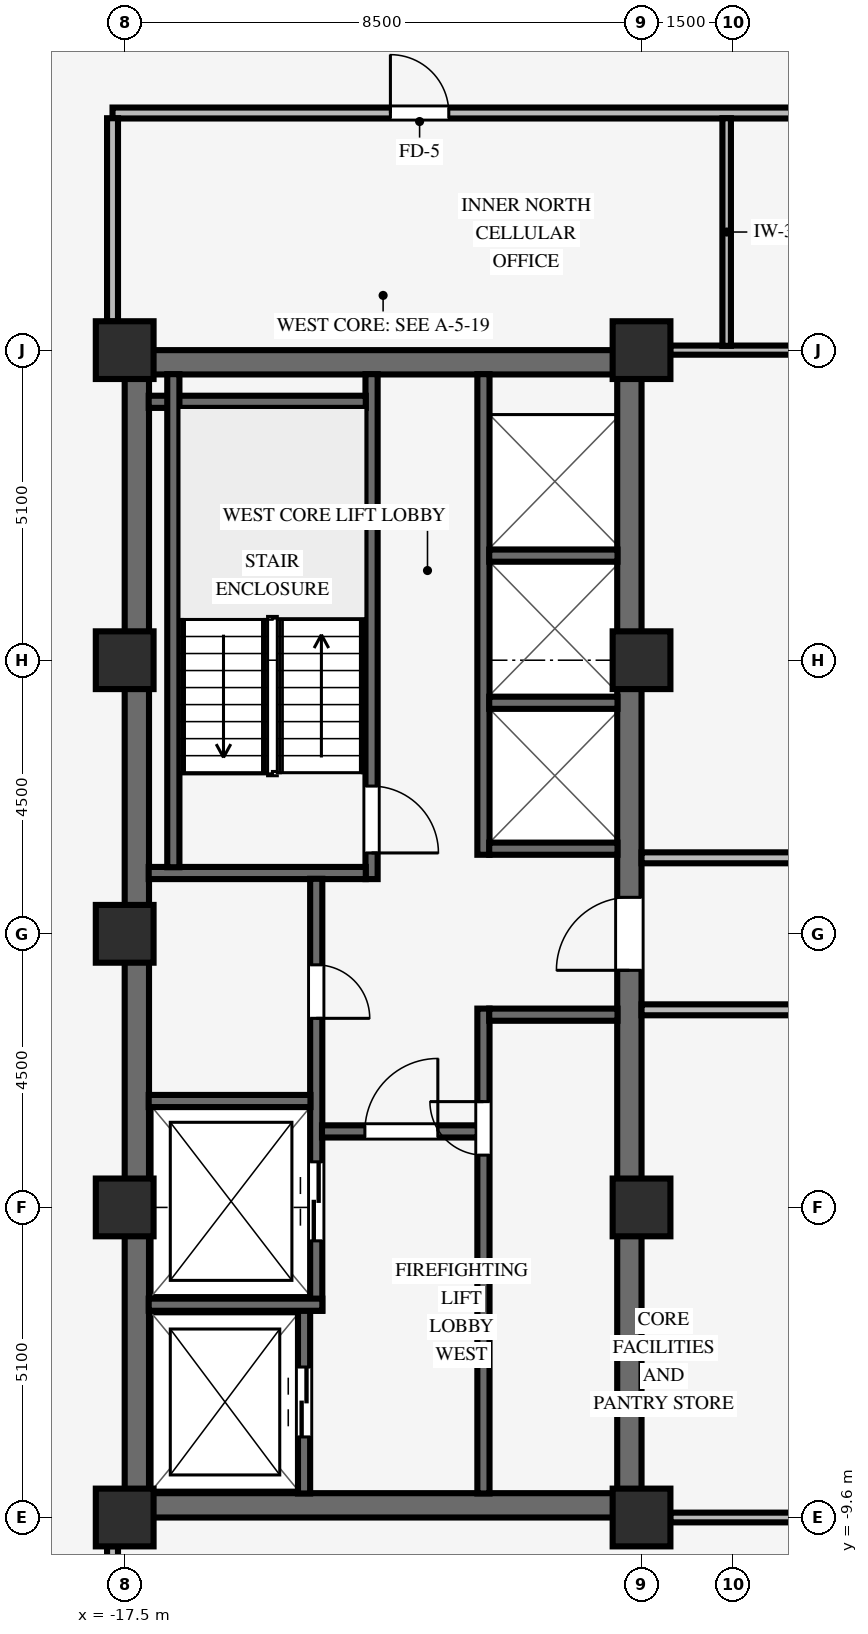
"""IFC4 building model, lengths in metres.
Left out: names, types, materials, properties, quantities, classifications, styles, units other than length and angle.
Written with IfcOpenShell. Run it as: python <this file> out.ifc"""

import sys

from ifc_helpers import new_model, si_unit, direction, frame, frame_2d, origin, origin_2d, place, context, subcontext, project, spatial, rectangle, extrude, source, transform, mapped, element, fill, save


model = new_model("IFC4")
c1 = context("Model", 3, precision=1e-05, world=origin(), true_north=direction((0.0, 1.0)))
c2 = subcontext(c1, "Body", "Model", "MODEL_VIEW")
j1 = project(units=[si_unit("LENGTHUNIT", "METRE"), si_unit("PLANEANGLEUNIT", "RADIAN")], contexts=[c1])
p1 = place(None, origin())
s1 = spatial("IfcSite", under=j1, at=p1, CompositionType="ELEMENT")
p2 = place(p1, origin())
s2 = spatial("IfcBuilding", under=s1, at=p2, CompositionType="ELEMENT")
p3 = place(p2, frame((0.0, 0.0, 138.45)))
s3 = spatial("IfcBuildingStorey", under=s2, at=p3, CompositionType="ELEMENT", Elevation=138.45)
for number, where, z_axis, x_axis in (
    (1, (-17.5, -9.4, 0.0), (0.0, 0.0, 1.0), (1.0, 0.0, 0.0)),
    (2, (-17.5, 9.4, 0.0), (0.0, 0.0, 1.0), (1.0, 0.0, 0.0)),
):
    element("IfcWall", number, at=place(p3, frame(where, z_axis=z_axis, x_axis=x_axis)), inside=s3, PredefinedType="SHEAR", context=c2, shape_type="SweptSolid", body=[
        extrude(rectangle(XDim=8.5, YDim=0.4, at=frame_2d((4.25, 0.0))), origin(), (0.0, 0.0, 1.0), 3.37),
    ])
p4 = place(p3, frame((-17.3, -9.205, 0.0), z_axis=(0.0, 0.0, 1.0), x_axis=(0.0, 1.0, 0.0)))
e3 = element("IfcWall", 3, at=p4, inside=s3, PredefinedType="SHEAR", context=c2, shape_type="SweptSolid", body=[
    extrude(rectangle(XDim=18.41, YDim=0.4, at=frame_2d((9.205, 0.0))), origin(), (0.0, 0.0, 1.0), 3.37),
])
p5 = place(p3, frame((-9.2, -9.205, 0.0), z_axis=(0.0, 0.0, 1.0), x_axis=(0.0, 1.0, 0.0)))
e4 = element("IfcWall", 4, at=p5, inside=s3, PredefinedType="SHEAR", context=c2, shape_type="SweptSolid", body=[
    extrude(rectangle(XDim=18.41, YDim=0.4, at=frame_2d((9.205, 0.0))), origin(), (0.0, 0.0, 1.0), 3.37),
])
p6 = place(p5, frame((8.605, 0.0, 0.0)))
e5 = element("IfcOpeningElement", 5, at=p6, cuts=e4, PredefinedType="OPENING", context=c2, shape_type="SweptSolid", body=[
    extrude(rectangle(XDim=1.2, YDim=2.15, at=frame_2d((0.6, 1.075))), frame((0.0, 0.21, 0.0), z_axis=(0.0, -1.0, 0.0), x_axis=(1.0, 0.0, 0.0)), (0.0, 0.0, 1.0), 0.42),
])
for number, where, z_axis, x_axis in (
    (6, (-17.5, -9.6, 0.0), (0.0, 0.0, 1.0), (1.0, 0.0, 0.0)),
    (7, (-17.5, -4.5, 0.0), (0.0, 0.0, 1.0), (1.0, 0.0, 0.0)),
    (8, (-17.5, 4.5, 0.0), (0.0, 0.0, 1.0), (1.0, 0.0, 0.0)),
    (9, (-17.5, 9.6, 0.0), (0.0, 0.0, 1.0), (1.0, 0.0, 0.0)),
    (10, (-9.0, -9.6, 0.0), (0.0, 0.0, 1.0), (1.0, 0.0, 0.0)),
    (11, (-9.0, -4.5, 0.0), (0.0, 0.0, 1.0), (1.0, 0.0, 0.0)),
    (12, (-9.0, 4.5, 0.0), (0.0, 0.0, 1.0), (1.0, 0.0, 0.0)),
    (13, (-9.0, 9.6, 0.0), (0.0, 0.0, 1.0), (1.0, 0.0, 0.0)),
    (14, (-17.5, 0.0, 0.0), (0.0, 0.0, 1.0), (1.0, 0.0, 0.0)),
):
    element("IfcColumn", number, at=place(p3, frame(where, z_axis=z_axis, x_axis=x_axis)), inside=s3, PredefinedType="COLUMN", context=c2, shape_type="SweptSolid", body=[
        extrude(rectangle(XDim=0.95, YDim=0.95, at=origin_2d()), origin(), (0.0, 0.0, 1.0), 3.37),
    ])
p7 = place(p3, frame((-13.44, 0.9, 0.0), z_axis=(0.0, 0.0, 1.0), x_axis=(0.0, 1.0, 0.0)))
e15 = element("IfcWall", 15, at=p7, inside=s3, PredefinedType="SHEAR", context=c2, shape_type="SweptSolid", body=[
    extrude(rectangle(XDim=8.305, YDim=0.2, at=frame_2d((4.153, 0.0))), origin(), (0.0, 0.0, 1.0), 3.37),
])
p8 = place(p7, frame((1.53, 0.0, 0.0), z_axis=(0.0, 0.0, 1.0), x_axis=(-1.0, 0.0, 0.0)))
e16 = element("IfcOpeningElement", 16, at=p8, cuts=e15, PredefinedType="OPENING", context=c2, shape_type="SweptSolid", body=[
    extrude(rectangle(XDim=1.1, YDim=2.15, at=frame_2d((0.55, 1.075))), frame((0.0, 0.11, 0.0), z_axis=(0.0, -1.0, 0.0), x_axis=(1.0, 0.0, 0.0)), (0.0, 0.0, 1.0), 0.22),
])
for number, where, z_axis, x_axis in (
    (17, (-17.105, 1.0, 0.0), (0.0, 0.0, 1.0), (1.0, 0.0, 0.0)),
    (18, (-17.105, 8.75, 0.0), (0.0, 0.0, 1.0), (1.0, 0.0, 0.0)),
):
    element("IfcWall", number, at=place(p3, frame(where, z_axis=z_axis, x_axis=x_axis)), inside=s3, PredefinedType="SHEAR", context=c2, shape_type="SweptSolid", body=[
        extrude(rectangle(XDim=3.57, YDim=0.2, at=frame_2d((1.785, 0.0))), origin(), (0.0, 0.0, 1.0), 3.37),
    ])
p9 = place(p3, frame((-16.7, 1.095, 0.0), z_axis=(0.0, 0.0, 1.0), x_axis=(0.0, 1.0, 0.0)))
e19 = element("IfcWall", 19, at=p9, inside=s3, PredefinedType="SHEAR", context=c2, shape_type="SweptSolid", body=[
    extrude(rectangle(XDim=8.11, YDim=0.2, at=frame_2d((4.055, 0.0))), origin(), (0.0, 0.0, 1.0), 3.37),
])
p10 = place(p3, frame((-14.55, -9.205, 0.0), z_axis=(0.0, 0.0, 1.0), x_axis=(0.0, 1.0, 0.0)))
e20 = element("IfcWall", 20, at=p10, inside=s3, PredefinedType="SHEAR", context=c2, shape_type="SweptSolid", body=[
    extrude(rectangle(XDim=3.01, YDim=0.2, at=frame_2d((1.505, 0.0))), origin(), (0.0, 0.0, 1.0), 3.37),
])
p11 = place(p10, frame((0.93, 0.0, 0.0)))
e21 = element("IfcOpeningElement", 21, at=p11, cuts=e20, PredefinedType="OPENING", context=c2, shape_type="SweptSolid", body=[
    extrude(rectangle(XDim=1.15, YDim=2.15, at=frame_2d((0.575, 1.075))), frame((0.0, 0.11, 0.0), z_axis=(0.0, -1.0, 0.0), x_axis=(1.0, 0.0, 0.0)), (0.0, 0.0, 1.0), 0.22),
])
p12 = place(p3, frame((-14.35, -6.2, 0.0), z_axis=(0.0, 0.0, 1.0), x_axis=(0.0, 1.0, 0.0)))
e22 = element("IfcWall", 22, at=p12, inside=s3, PredefinedType="SHEAR", context=c2, shape_type="SweptSolid", body=[
    extrude(rectangle(XDim=7.105, YDim=0.2, at=frame_2d((3.552, 0.0))), origin(), (0.0, 0.0, 1.0), 3.37),
])
p13 = place(p12, frame((5.69, 0.0, 0.0), z_axis=(0.0, 0.0, 1.0), x_axis=(-1.0, 0.0, 0.0)))
e23 = element("IfcOpeningElement", 23, at=p13, cuts=e22, PredefinedType="OPENING", context=c2, shape_type="SweptSolid", body=[
    extrude(rectangle(XDim=0.88, YDim=2.1, at=frame_2d((0.44, 1.05))), frame((0.0, 0.11, 0.0), z_axis=(0.0, -1.0, 0.0), x_axis=(1.0, 0.0, 0.0)), (0.0, 0.0, 1.0), 0.22),
])
p14 = place(p12, frame((1.15, 0.0, 0.0)))
e24 = element("IfcOpeningElement", 24, at=p14, cuts=e22, PredefinedType="OPENING", context=c2, shape_type="SweptSolid", body=[
    extrude(rectangle(XDim=1.3, YDim=2.2, at=frame_2d((0.65, 1.1))), frame((0.0, 0.11, 0.0), z_axis=(0.0, -1.0, 0.0), x_axis=(1.0, 0.0, 0.0)), (0.0, 0.0, 1.0), 0.22),
])
p15 = place(p3, frame((-17.105, -6.1, 0.0), z_axis=(0.0, 0.0, 1.0), x_axis=(1.0, 0.0, 0.0)))
e25 = element("IfcWall", 25, at=p15, inside=s3, PredefinedType="SHEAR", context=c2, shape_type="SweptSolid", body=[
    extrude(rectangle(XDim=2.855, YDim=0.2, at=frame_2d((1.427, 0.0))), origin(), (0.0, 0.0, 1.0), 3.37),
])
p16 = place(p3, frame((-17.105, -2.75, 0.0), z_axis=(0.0, 0.0, 1.0), x_axis=(1.0, 0.0, 0.0)))
e26 = element("IfcWall", 26, at=p16, inside=s3, PredefinedType="SHEAR", context=c2, shape_type="SweptSolid", body=[
    extrude(rectangle(XDim=2.66, YDim=0.2, at=frame_2d((1.33, 0.0))), origin(), (0.0, 0.0, 1.0), 3.37),
])
p17 = place(p3, frame((-11.6, -9.205, 0.0), z_axis=(0.0, 0.0, 1.0), x_axis=(0.0, 1.0, 0.0)))
e27 = element("IfcWall", 27, at=p17, inside=s3, PredefinedType="SHEAR", context=c2, shape_type="SweptSolid", body=[
    extrude(rectangle(XDim=7.975, YDim=0.2, at=frame_2d((3.988, 0.0))), origin(), (0.0, 0.0, 1.0), 3.37),
])
p18 = place(p17, frame((5.565, 0.0, 0.0)))
e28 = element("IfcOpeningElement", 28, at=p18, cuts=e27, PredefinedType="OPENING", context=c2, shape_type="SweptSolid", body=[
    extrude(rectangle(XDim=0.88, YDim=2.1, at=frame_2d((0.44, 1.05))), frame((0.0, 0.11, 0.0), z_axis=(0.0, -1.0, 0.0), x_axis=(1.0, 0.0, 0.0)), (0.0, 0.0, 1.0), 0.22),
])
p19 = place(p3, frame((-14.255, -3.25, 0.0), z_axis=(0.0, 0.0, 1.0), x_axis=(1.0, 0.0, 0.0)))
e29 = element("IfcWall", 29, at=p19, inside=s3, PredefinedType="SHEAR", context=c2, shape_type="SweptSolid", body=[
    extrude(rectangle(XDim=2.56, YDim=0.2, at=frame_2d((1.28, 0.0))), origin(), (0.0, 0.0, 1.0), 3.37),
])
p20 = place(p19, frame((0.705, 0.0, 0.0)))
e30 = element("IfcOpeningElement", 30, at=p20, cuts=e29, PredefinedType="OPENING", context=c2, shape_type="SweptSolid", body=[
    extrude(rectangle(XDim=1.2, YDim=2.15, at=frame_2d((0.6, 1.075))), frame((0.0, 0.11, 0.0), z_axis=(0.0, -1.0, 0.0), x_axis=(1.0, 0.0, 0.0)), (0.0, 0.0, 1.0), 0.22),
])
p21 = place(p3, frame((-11.505, -1.33, 0.0), z_axis=(0.0, 0.0, 1.0), x_axis=(1.0, 0.0, 0.0)))
e31 = element("IfcWall", 31, at=p21, inside=s3, PredefinedType="SHEAR", context=c2, shape_type="SweptSolid", body=[
    extrude(rectangle(XDim=2.11, YDim=0.2, at=frame_2d((1.055, 0.0))), origin(), (0.0, 0.0, 1.0), 3.37),
])
p22 = place(p3, frame((-11.6, 1.3, 0.0), z_axis=(0.0, 0.0, 1.0), x_axis=(0.0, 1.0, 0.0)))
e32 = element("IfcWall", 32, at=p22, inside=s3, PredefinedType="SHEAR", context=c2, shape_type="SweptSolid", body=[
    extrude(rectangle(XDim=7.905, YDim=0.2, at=frame_2d((3.953, 0.0))), origin(), (0.0, 0.0, 1.0), 3.37),
])
for number, where, z_axis, x_axis in (
    (33, (-11.505, 1.4, 0.0), (0.0, 0.0, 1.0), (1.0, 0.0, 0.0)),
    (34, (-11.505, 3.8, 0.0), (0.0, 0.0, 1.0), (1.0, 0.0, 0.0)),
    (35, (-11.505, 6.22, 0.0), (0.0, 0.0, 1.0), (1.0, 0.0, 0.0)),
):
    element("IfcWall", number, at=place(p3, frame(where, z_axis=z_axis, x_axis=x_axis)), inside=s3, PredefinedType="SHEAR", context=c2, shape_type="SweptSolid", body=[
        extrude(rectangle(XDim=2.11, YDim=0.2, at=frame_2d((1.055, 0.0))), origin(), (0.0, 0.0, 1.0), 3.37),
    ])
p23 = place(p3, frame((-8.529, -9.6, 0.0), z_axis=(0.0, 0.0, 1.0), x_axis=(1.0, 0.0, 0.0)))
e36 = element("IfcWall", 36, at=p23, inside=s3, PredefinedType="PARTITIONING", context=c2, shape_type="SweptSolid", body=[
    extrude(rectangle(XDim=8.353, YDim=0.16, at=frame_2d((4.177, 0.0))), origin(), (0.0, 0.0, 1.0), 2.405),
])
p24 = place(p3, frame((-9.0, -1.25, 0.0), z_axis=(0.0, 0.0, 1.0), x_axis=(1.0, 0.0, 0.0)))
e37 = element("IfcWall", 37, at=p24, inside=s3, PredefinedType="PARTITIONING", context=c2, shape_type="SweptSolid", body=[
    extrude(rectangle(XDim=15.6, YDim=0.18, at=frame_2d((7.8, 0.0))), origin(), (0.0, 0.0, 1.0), 3.36),
])
p25 = place(p24, frame((3.92, 0.0, 0.0)))
e38 = element("IfcOpeningElement", 38, at=p25, cuts=e37, PredefinedType="OPENING", context=c2, shape_type="SweptSolid", body=[
    extrude(rectangle(XDim=0.96, YDim=2.1, at=frame_2d((0.48, 1.05))), frame((0.0, 0.1, 0.0), z_axis=(0.0, -1.0, 0.0), x_axis=(1.0, 0.0, 0.0)), (0.0, 0.0, 1.0), 0.2),
])
p26 = place(p3, frame((-9.0, 1.25, 0.0), z_axis=(0.0, 0.0, 1.0), x_axis=(1.0, 0.0, 0.0)))
e39 = element("IfcWall", 39, at=p26, inside=s3, PredefinedType="PARTITIONING", context=c2, shape_type="SweptSolid", body=[
    extrude(rectangle(XDim=15.6, YDim=0.18, at=frame_2d((7.8, 0.0))), origin(), (0.0, 0.0, 1.0), 3.36),
])
p27 = place(p26, frame((4.12, 0.0, 0.0)))
e40 = element("IfcOpeningElement", 40, at=p27, cuts=e39, PredefinedType="OPENING", context=c2, shape_type="SweptSolid", body=[
    extrude(rectangle(XDim=0.96, YDim=2.1, at=frame_2d((0.48, 1.05))), frame((0.0, 0.1, 0.0), z_axis=(0.0, -1.0, 0.0), x_axis=(1.0, 0.0, 0.0)), (0.0, 0.0, 1.0), 0.2),
])
p28 = place(p3, frame((-8.529, 9.6, 0.0), z_axis=(0.0, 0.0, 1.0), x_axis=(1.0, 0.0, 0.0)))
e41 = element("IfcWall", 41, at=p28, inside=s3, PredefinedType="PARTITIONING", context=c2, shape_type="SweptSolid", body=[
    extrude(rectangle(XDim=8.353, YDim=0.15, at=frame_2d((4.177, 0.0))), origin(), (0.0, 0.0, 1.0), 2.405),
])
p29 = place(p3, frame((-17.7, 13.5, 0.0), z_axis=(0.0, 0.0, 1.0), x_axis=(1.0, 0.0, 0.0)))
e42 = element("IfcWall", 42, at=p29, inside=s3, PredefinedType="PARTITIONING", context=c2, shape_type="SweptSolid", body=[
    extrude(rectangle(XDim=24.3, YDim=0.18, at=frame_2d((12.15, 0.0))), origin(), (0.0, 0.0, 1.0), 2.998),
])
p30 = place(p29, frame((4.57, 0.0, 0.0)))
e43 = element("IfcOpeningElement", 43, at=p30, cuts=e42, PredefinedType="OPENING", context=c2, shape_type="SweptSolid", body=[
    extrude(rectangle(XDim=0.96, YDim=2.1, at=frame_2d((0.48, 1.05))), frame((0.0, 0.1, 0.0), z_axis=(0.0, -1.0, 0.0), x_axis=(1.0, 0.0, 0.0)), (0.0, 0.0, 1.0), 0.2),
])
p31 = place(p29, frame((13.72, 0.0, 0.0)))
e44 = element("IfcOpeningElement", 44, at=p31, cuts=e42, PredefinedType="OPENING", context=c2, shape_type="SweptSolid", body=[
    extrude(rectangle(XDim=0.96, YDim=2.1, at=frame_2d((0.48, 1.05))), frame((0.0, 0.1, 0.0), z_axis=(0.0, -1.0, 0.0), x_axis=(1.0, 0.0, 0.0)), (0.0, 0.0, 1.0), 0.2),
])
p32 = place(p29, frame((18.9, 0.0, 0.0)))
e45 = element("IfcOpeningElement", 45, at=p32, cuts=e42, PredefinedType="OPENING", context=c2, shape_type="SweptSolid", body=[
    extrude(rectangle(XDim=0.9, YDim=2.1, at=frame_2d((0.45, 1.05))), frame((0.0, 0.1, 0.0), z_axis=(0.0, -1.0, 0.0), x_axis=(1.0, 0.0, 0.0)), (0.0, 0.0, 1.0), 0.2),
])
p33 = place(p29, frame((21.0, 0.0, 0.0)))
e46 = element("IfcOpeningElement", 46, at=p33, cuts=e42, PredefinedType="OPENING", context=c2, shape_type="SweptSolid", body=[
    extrude(rectangle(XDim=0.9, YDim=2.1, at=frame_2d((0.45, 1.05))), frame((0.0, 0.1, 0.0), z_axis=(0.0, -1.0, 0.0), x_axis=(1.0, 0.0, 0.0)), (0.0, 0.0, 1.0), 0.2),
])
for number, where, z_axis, x_axis in (
    (47, (-17.7, -13.414, 0.0), (0.0, 0.0, 1.0), (0.0, 1.0, 0.0)),
    (48, (-17.7, 10.071, 0.0), (0.0, 0.0, 1.0), (0.0, 1.0, 0.0)),
):
    element("IfcWall", number, at=place(p3, frame(where, z_axis=z_axis, x_axis=x_axis)), inside=s3, PredefinedType="PARTITIONING", context=c2, shape_type="SweptSolid", body=[
        extrude(rectangle(XDim=3.343, YDim=0.18, at=frame_2d((1.671, 0.0))), origin(), (0.0, 0.0, 1.0), 2.816),
    ])
p34 = place(p3, frame((-7.6, 9.671, 0.0), z_axis=(0.0, 0.0, 1.0), x_axis=(0.0, 1.0, 0.0)))
e49 = element("IfcWall", 49, at=p34, inside=s3, PredefinedType="PARTITIONING", context=c2, shape_type="SweptSolid", body=[
    extrude(rectangle(XDim=3.743, YDim=0.14, at=frame_2d((1.872, 0.0))), origin(), (0.0, 0.0, 1.0), 3.36),
])
m1 = source(origin(), c2, "Body", "SweptSolid", [
    extrude(rectangle(XDim=1.1, YDim=2.15, at=frame_2d((0.55, 1.075))), frame((0.0, 0.025, 0.0), z_axis=(0.0, -1.0, 0.0), x_axis=(1.0, 0.0, 0.0)), (0.0, 0.0, 1.0), 0.05),
])
p35 = place(p8, origin())
e50 = element("IfcDoor", 50, at=p35, inside=s3, OperationType="SINGLE_SWING_RIGHT", PredefinedType="DOOR", context=c2, shape_type="MappedRepresentation", body=[
    mapped(m1, transform((0.0, 0.0, 0.0), scale=1.0)),
])
fill(e16, e50)
m2 = source(origin(), c2, "Body", "SweptSolid", [
    extrude(rectangle(XDim=0.88, YDim=2.1, at=frame_2d((0.44, 1.05))), frame((0.0, 0.025, 0.0), z_axis=(0.0, -1.0, 0.0), x_axis=(1.0, 0.0, 0.0)), (0.0, 0.0, 1.0), 0.05),
])
p36 = place(p13, origin())
e51 = element("IfcDoor", 51, at=p36, inside=s3, OperationType="SINGLE_SWING_RIGHT", PredefinedType="DOOR", context=c2, shape_type="MappedRepresentation", body=[
    mapped(m2, transform((0.0, 0.0, 0.0), scale=1.0)),
])
fill(e23, e51)
m3 = source(origin(), c2, "Body", "SweptSolid", [
    extrude(rectangle(XDim=1.2, YDim=2.15, at=frame_2d((0.6, 1.075))), frame((0.0, 0.025, 0.0), z_axis=(0.0, -1.0, 0.0), x_axis=(1.0, 0.0, 0.0)), (0.0, 0.0, 1.0), 0.05),
])
p37 = place(p20, origin())
e52 = element("IfcDoor", 52, at=p37, inside=s3, OperationType="SINGLE_SWING_RIGHT", PredefinedType="DOOR", context=c2, shape_type="MappedRepresentation", body=[
    mapped(m3, transform((0.0, 0.0, 0.0), scale=1.0)),
])
fill(e30, e52)
p38 = place(p18, origin())
e53 = element("IfcDoor", 53, at=p38, inside=s3, OperationType="SINGLE_SWING_RIGHT", PredefinedType="DOOR", context=c2, shape_type="MappedRepresentation", body=[
    mapped(m2, transform((0.0, 0.0, 0.0), scale=1.0)),
])
fill(e28, e53)
p39 = place(p6, origin())
e54 = element("IfcDoor", 54, at=p39, inside=s3, OperationType="SINGLE_SWING_LEFT", PredefinedType="DOOR", context=c2, shape_type="MappedRepresentation", body=[
    mapped(m3, transform((0.0, 0.0, 0.0), scale=1.0)),
])
fill(e5, e54)
m4 = source(origin(), c2, "Body", "SweptSolid", [
    extrude(rectangle(XDim=1.15, YDim=2.15, at=frame_2d((0.575, 1.075))), frame((0.0, 0.025, 0.0), z_axis=(0.0, -1.0, 0.0), x_axis=(1.0, 0.0, 0.0)), (0.0, 0.0, 1.0), 0.05),
])
p40 = place(p11, origin())
e55 = element("IfcDoor", 55, at=p40, inside=s3, OperationType="DOUBLE_DOOR_SLIDING", PredefinedType="DOOR", context=c2, shape_type="MappedRepresentation", body=[
    mapped(m4, transform((0.0, 0.0, 0.0), scale=1.0)),
])
fill(e21, e55)
m5 = source(origin(), c2, "Body", "SweptSolid", [
    extrude(rectangle(XDim=1.3, YDim=2.2, at=frame_2d((0.65, 1.1))), frame((0.0, 0.025, 0.0), z_axis=(0.0, -1.0, 0.0), x_axis=(1.0, 0.0, 0.0)), (0.0, 0.0, 1.0), 0.05),
])
p41 = place(p14, origin())
e56 = element("IfcDoor", 56, at=p41, inside=s3, OperationType="DOUBLE_DOOR_SLIDING", PredefinedType="DOOR", context=c2, shape_type="MappedRepresentation", body=[
    mapped(m5, transform((0.0, 0.0, 0.0), scale=1.0)),
])
fill(e24, e56)
m6 = source(origin(), c2, "Body", "SweptSolid", [
    extrude(rectangle(XDim=0.96, YDim=2.1, at=frame_2d((0.48, 1.05))), frame((0.0, 0.025, 0.0), z_axis=(0.0, -1.0, 0.0), x_axis=(1.0, 0.0, 0.0)), (0.0, 0.0, 1.0), 0.05),
])
p42 = place(p30, origin())
e57 = element("IfcDoor", 57, at=p42, inside=s3, OperationType="SINGLE_SWING_LEFT", PredefinedType="DOOR", context=c2, shape_type="MappedRepresentation", body=[
    mapped(m6, transform((0.0, 0.0, 0.0), scale=1.0)),
])
fill(e43, e57)
save(model, sys.argv[1])
